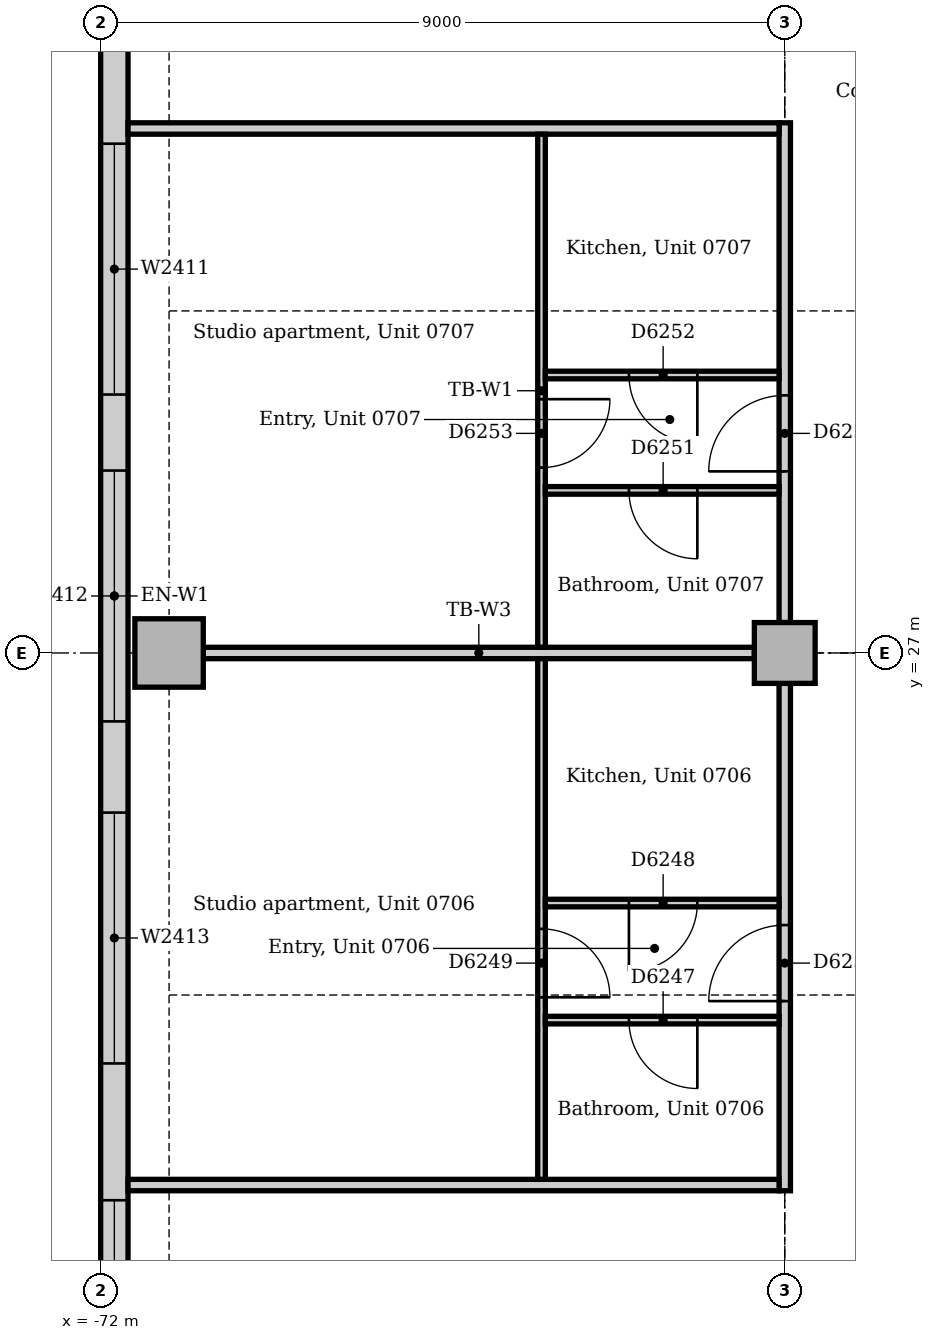
"""IFC4 building model, lengths in metres.
Left out: names, types, materials, properties, quantities, classifications, styles, units other than length and angle.
Written with IfcOpenShell. Run it as: python <this file> out.ifc"""

import sys

from ifc_helpers import new_model, si_unit, direction, frame, frame_2d, origin, origin_2d, place, context, subcontext, project, spatial, rectangle, extrude, element, fill, save


model = new_model("IFC4")
c1 = context("Model", 3, precision=1e-05, world=origin(), true_north=direction((0.0, 1.0)))
c2 = subcontext(c1, "Body", "Model", "MODEL_VIEW")
j1 = project(units=[si_unit("LENGTHUNIT", "METRE"), si_unit("PLANEANGLEUNIT", "RADIAN")], contexts=[c1])
p1 = place(None, origin())
s1 = spatial("IfcSite", under=j1, at=p1, CompositionType="ELEMENT")
p2 = place(p1, origin())
s2 = spatial("IfcBuilding", under=s1, at=p2, CompositionType="ELEMENT")
p3 = place(p2, frame((0.0, 0.0, 34.0)))
s3 = spatial("IfcBuildingStorey", under=s2, at=p3, CompositionType="ELEMENT", Elevation=34.0)
p4 = place(p3, frame((-71.1, 27.0, 0.0), z_axis=(0.0, 0.0, 1.0), x_axis=(1.0, 0.0, 0.0)))
e1 = element("IfcColumn", 1, at=p4, inside=s3, PredefinedType="COLUMN", context=c2, shape_type="SweptSolid", body=[
    extrude(rectangle(XDim=0.9, YDim=0.9, at=origin_2d()), origin(), (0.0, 0.0, 1.0), 3.85),
])
p5 = place(p3, frame((-63.0, 27.0, 0.0), z_axis=(0.0, 0.0, 1.0), x_axis=(1.0, 0.0, 0.0)))
e2 = element("IfcColumn", 2, at=p5, inside=s3, PredefinedType="COLUMN", context=c2, shape_type="SweptSolid", body=[
    extrude(rectangle(XDim=0.8, YDim=0.8, at=origin_2d()), origin(), (0.0, 0.0, 1.0), 3.85),
])
p6 = place(p3, frame((-71.82, 40.757, 0.0), z_axis=(0.0, 0.0, 1.0), x_axis=(0.0, -1.0, 0.0)))
e3 = element("IfcWall", 3, at=p6, inside=s3, PredefinedType="STANDARD", context=c2, shape_type="SweptSolid", body=[
    extrude(rectangle(XDim=26.015, YDim=0.36, at=frame_2d((13.007, 0.0))), origin(), (0.0, 0.0, 1.0), 3.85),
])
p7 = place(p6, frame((2.357, 0.0, 0.9)))
e4 = element("IfcOpeningElement", 4, at=p7, cuts=e3, PredefinedType="OPENING", context=c2, shape_type="SweptSolid", body=[
    extrude(rectangle(XDim=3.3, YDim=1.6, at=frame_2d((1.65, 0.8))), frame((0.0, 0.19, 0.0), z_axis=(0.0, -1.0, 0.0), x_axis=(1.0, 0.0, 0.0)), (0.0, 0.0, 1.0), 0.38),
])
p8 = place(p6, frame((7.057, 0.0, 0.9)))
e5 = element("IfcOpeningElement", 5, at=p8, cuts=e3, PredefinedType="OPENING", context=c2, shape_type="SweptSolid", body=[
    extrude(rectangle(XDim=3.3, YDim=1.6, at=frame_2d((1.65, 0.8))), frame((0.0, 0.19, 0.0), z_axis=(0.0, -1.0, 0.0), x_axis=(1.0, 0.0, 0.0)), (0.0, 0.0, 1.0), 0.38),
])
p9 = place(p6, frame((11.357, 0.0, 0.9)))
e6 = element("IfcOpeningElement", 6, at=p9, cuts=e3, PredefinedType="OPENING", context=c2, shape_type="SweptSolid", body=[
    extrude(rectangle(XDim=3.3, YDim=1.6, at=frame_2d((1.65, 0.8))), frame((0.0, 0.19, 0.0), z_axis=(0.0, -1.0, 0.0), x_axis=(1.0, 0.0, 0.0)), (0.0, 0.0, 1.0), 0.38),
])
p10 = place(p6, frame((15.857, 0.0, 0.9)))
e7 = element("IfcOpeningElement", 7, at=p10, cuts=e3, PredefinedType="OPENING", context=c2, shape_type="SweptSolid", body=[
    extrude(rectangle(XDim=3.3, YDim=1.6, at=frame_2d((1.65, 0.8))), frame((0.0, 0.19, 0.0), z_axis=(0.0, -1.0, 0.0), x_axis=(1.0, 0.0, 0.0)), (0.0, 0.0, 1.0), 0.38),
])
p11 = place(p6, frame((20.957, 0.0, 0.9)))
e8 = element("IfcOpeningElement", 8, at=p11, cuts=e3, PredefinedType="OPENING", context=c2, shape_type="SweptSolid", body=[
    extrude(rectangle(XDim=3.3, YDim=1.6, at=frame_2d((1.65, 0.8))), frame((0.0, 0.19, 0.0), z_axis=(0.0, -1.0, 0.0), x_axis=(1.0, 0.0, 0.0)), (0.0, 0.0, 1.0), 0.38),
])
p12 = place(p3, frame((-63.0, 19.925, 0.0), z_axis=(0.0, 0.0, 1.0), x_axis=(0.0, 1.0, 0.0)))
e9 = element("IfcWall", 9, at=p12, inside=s3, PredefinedType="PARTITIONING", context=c2, shape_type="SweptSolid", body=[
    extrude(rectangle(XDim=6.675, YDim=0.15, at=frame_2d((3.337, 0.0))), origin(), (0.0, 0.0, 1.0), 3.158),
])
p13 = place(p12, frame((2.495, 0.0, 0.0)))
e10 = element("IfcOpeningElement", 10, at=p13, cuts=e9, PredefinedType="OPENING", context=c2, shape_type="SweptSolid", body=[
    extrude(rectangle(XDim=1.0, YDim=2.1, at=frame_2d((0.5, 1.05))), frame((0.0, 0.085, 0.0), z_axis=(0.0, -1.0, 0.0), x_axis=(1.0, 0.0, 0.0)), (0.0, 0.0, 1.0), 0.17),
])
p14 = place(p3, frame((-63.0, 27.4, 0.0), z_axis=(0.0, 0.0, 1.0), x_axis=(0.0, 1.0, 0.0)))
e11 = element("IfcWall", 11, at=p14, inside=s3, PredefinedType="PARTITIONING", context=c2, shape_type="SweptSolid", body=[
    extrude(rectangle(XDim=6.575, YDim=0.15, at=frame_2d((3.288, 0.0))), origin(), (0.0, 0.0, 1.0), 3.158),
])
p15 = place(p14, frame((1.989, 0.0, 0.0)))
e12 = element("IfcOpeningElement", 12, at=p15, cuts=e11, PredefinedType="OPENING", context=c2, shape_type="SweptSolid", body=[
    extrude(rectangle(XDim=1.0, YDim=2.1, at=frame_2d((0.5, 1.05))), frame((0.0, 0.085, 0.0), z_axis=(0.0, -1.0, 0.0), x_axis=(1.0, 0.0, 0.0)), (0.0, 0.0, 1.0), 0.17),
])
for number, where, z_axis, x_axis in (
    (13, (-71.64, 20.0, 0.0), (0.0, 0.0, 1.0), (1.0, 0.0, 0.0)),
    (14, (-71.64, 33.9, 0.0), (0.0, 0.0, 1.0), (1.0, 0.0, 0.0)),
):
    element("IfcWall", number, at=place(p3, frame(where, z_axis=z_axis, x_axis=x_axis)), inside=s3, PredefinedType="PARTITIONING", context=c2, shape_type="SweptSolid", body=[
        extrude(rectangle(XDim=8.565, YDim=0.15, at=frame_2d((4.282, 0.0))), origin(), (0.0, 0.0, 1.0), 3.85),
    ])
p16 = place(p3, frame((-70.65, 27.0, 0.0), z_axis=(0.0, 0.0, 1.0), x_axis=(1.0, 0.0, 0.0)))
e15 = element("IfcWall", 15, at=p16, inside=s3, PredefinedType="PARTITIONING", context=c2, shape_type="SweptSolid", body=[
    extrude(rectangle(XDim=7.25, YDim=0.15, at=frame_2d((3.625, 0.0))), origin(), (0.0, 0.0, 1.0), 3.15),
])
p17 = place(p3, frame((-66.2, 27.075, 0.0), z_axis=(0.0, 0.0, 1.0), x_axis=(0.0, 1.0, 0.0)))
e16 = element("IfcWall", 16, at=p17, inside=s3, PredefinedType="PARTITIONING", context=c2, shape_type="SweptSolid", body=[
    extrude(rectangle(XDim=6.75, YDim=0.1, at=frame_2d((3.375, 0.0))), origin(), (0.0, 0.0, 1.0), 3.85),
])
p18 = place(p17, frame((2.364, 0.0, 0.0)))
e17 = element("IfcOpeningElement", 17, at=p18, cuts=e16, PredefinedType="OPENING", context=c2, shape_type="SweptSolid", body=[
    extrude(rectangle(XDim=0.9, YDim=2.1, at=frame_2d((0.45, 1.05))), frame((0.0, 0.06, 0.0), z_axis=(0.0, -1.0, 0.0), x_axis=(1.0, 0.0, 0.0)), (0.0, 0.0, 1.0), 0.12),
])
p19 = place(p3, frame((-66.2, 20.075, 0.0), z_axis=(0.0, 0.0, 1.0), x_axis=(0.0, 1.0, 0.0)))
e18 = element("IfcWall", 18, at=p19, inside=s3, PredefinedType="PARTITIONING", context=c2, shape_type="SweptSolid", body=[
    extrude(rectangle(XDim=6.85, YDim=0.1, at=frame_2d((3.425, 0.0))), origin(), (0.0, 0.0, 1.0), 3.85),
])
p20 = place(p19, frame((2.395, 0.0, 0.0)))
e19 = element("IfcOpeningElement", 19, at=p20, cuts=e18, PredefinedType="OPENING", context=c2, shape_type="SweptSolid", body=[
    extrude(rectangle(XDim=0.9, YDim=2.1, at=frame_2d((0.45, 1.05))), frame((0.0, 0.06, 0.0), z_axis=(0.0, -1.0, 0.0), x_axis=(1.0, 0.0, 0.0)), (0.0, 0.0, 1.0), 0.12),
])
p21 = place(p3, frame((-66.15, 22.17, 0.0), z_axis=(0.0, 0.0, 1.0), x_axis=(1.0, 0.0, 0.0)))
e20 = element("IfcWall", 20, at=p21, inside=s3, PredefinedType="PARTITIONING", context=c2, shape_type="SweptSolid", body=[
    extrude(rectangle(XDim=3.075, YDim=0.1, at=frame_2d((1.538, 0.0))), origin(), (0.0, 0.0, 1.0), 3.85),
])
p22 = place(p21, frame((1.1, 0.0, 0.0)))
e21 = element("IfcOpeningElement", 21, at=p22, cuts=e20, PredefinedType="OPENING", context=c2, shape_type="SweptSolid", body=[
    extrude(rectangle(XDim=0.9, YDim=2.1, at=frame_2d((0.45, 1.05))), frame((0.0, 0.06, 0.0), z_axis=(0.0, -1.0, 0.0), x_axis=(1.0, 0.0, 0.0)), (0.0, 0.0, 1.0), 0.12),
])
p23 = place(p3, frame((-66.15, 23.71, 0.0), z_axis=(0.0, 0.0, 1.0), x_axis=(1.0, 0.0, 0.0)))
e22 = element("IfcWall", 22, at=p23, inside=s3, PredefinedType="PARTITIONING", context=c2, shape_type="SweptSolid", body=[
    extrude(rectangle(XDim=3.075, YDim=0.1, at=frame_2d((1.538, 0.0))), origin(), (0.0, 0.0, 1.0), 3.85),
])
p24 = place(p23, frame((1.1, 0.0, 0.0)))
e23 = element("IfcOpeningElement", 23, at=p24, cuts=e22, PredefinedType="OPENING", context=c2, shape_type="SweptSolid", body=[
    extrude(rectangle(XDim=0.9, YDim=2.1, at=frame_2d((0.45, 1.05))), frame((0.0, 0.06, 0.0), z_axis=(0.0, -1.0, 0.0), x_axis=(1.0, 0.0, 0.0)), (0.0, 0.0, 1.0), 0.12),
])
p25 = place(p3, frame((-66.15, 29.139, 0.0), z_axis=(0.0, 0.0, 1.0), x_axis=(1.0, 0.0, 0.0)))
e24 = element("IfcWall", 24, at=p25, inside=s3, PredefinedType="PARTITIONING", context=c2, shape_type="SweptSolid", body=[
    extrude(rectangle(XDim=3.075, YDim=0.1, at=frame_2d((1.538, 0.0))), origin(), (0.0, 0.0, 1.0), 3.85),
])
p26 = place(p25, frame((1.1, 0.0, 0.0)))
e25 = element("IfcOpeningElement", 25, at=p26, cuts=e24, PredefinedType="OPENING", context=c2, shape_type="SweptSolid", body=[
    extrude(rectangle(XDim=0.9, YDim=2.1, at=frame_2d((0.45, 1.05))), frame((0.0, 0.06, 0.0), z_axis=(0.0, -1.0, 0.0), x_axis=(1.0, 0.0, 0.0)), (0.0, 0.0, 1.0), 0.12),
])
p27 = place(p3, frame((-66.15, 30.657, 0.0), z_axis=(0.0, 0.0, 1.0), x_axis=(1.0, 0.0, 0.0)))
e26 = element("IfcWall", 26, at=p27, inside=s3, PredefinedType="PARTITIONING", context=c2, shape_type="SweptSolid", body=[
    extrude(rectangle(XDim=3.075, YDim=0.1, at=frame_2d((1.538, 0.0))), origin(), (0.0, 0.0, 1.0), 3.85),
])
p28 = place(p27, frame((1.1, 0.0, 0.0)))
e27 = element("IfcOpeningElement", 27, at=p28, cuts=e26, PredefinedType="OPENING", context=c2, shape_type="SweptSolid", body=[
    extrude(rectangle(XDim=0.9, YDim=2.1, at=frame_2d((0.45, 1.05))), frame((0.0, 0.06, 0.0), z_axis=(0.0, -1.0, 0.0), x_axis=(1.0, 0.0, 0.0)), (0.0, 0.0, 1.0), 0.12),
])
p29 = place(p8, origin())
e28 = element("IfcWindow", 28, at=p29, inside=s3, PartitioningType="SINGLE_PANEL", PredefinedType="WINDOW", context=c2, shape_type="SweptSolid", body=[
    extrude(rectangle(XDim=3.3, YDim=1.6, at=frame_2d((1.65, 0.8))), frame((0.0, 0.13, 0.0), z_axis=(0.0, -1.0, 0.0), x_axis=(1.0, 0.0, 0.0)), (0.0, 0.0, 1.0), 0.06),
])
fill(e5, e28)
p30 = place(p9, origin())
e29 = element("IfcWindow", 29, at=p30, inside=s3, PartitioningType="SINGLE_PANEL", PredefinedType="WINDOW", context=c2, shape_type="SweptSolid", body=[
    extrude(rectangle(XDim=3.3, YDim=1.6, at=frame_2d((1.65, 0.8))), frame((0.0, 0.13, 0.0), z_axis=(0.0, -1.0, 0.0), x_axis=(1.0, 0.0, 0.0)), (0.0, 0.0, 1.0), 0.06),
])
fill(e6, e29)
p31 = place(p10, origin())
e30 = element("IfcWindow", 30, at=p31, inside=s3, PartitioningType="SINGLE_PANEL", PredefinedType="WINDOW", context=c2, shape_type="SweptSolid", body=[
    extrude(rectangle(XDim=3.3, YDim=1.6, at=frame_2d((1.65, 0.8))), frame((0.0, 0.13, 0.0), z_axis=(0.0, -1.0, 0.0), x_axis=(1.0, 0.0, 0.0)), (0.0, 0.0, 1.0), 0.06),
])
fill(e7, e30)
p32 = place(p11, origin())
e31 = element("IfcWindow", 31, at=p32, inside=s3, PartitioningType="SINGLE_PANEL", PredefinedType="WINDOW", context=c2, shape_type="SweptSolid", body=[
    extrude(rectangle(XDim=3.3, YDim=1.6, at=frame_2d((1.65, 0.8))), frame((0.0, 0.13, 0.0), z_axis=(0.0, -1.0, 0.0), x_axis=(1.0, 0.0, 0.0)), (0.0, 0.0, 1.0), 0.06),
])
fill(e8, e31)
p33 = place(p22, frame((0.9, 0.0, 0.0), z_axis=(0.0, 0.0, 1.0), x_axis=(-1.0, 0.0, 0.0)))
e32 = element("IfcDoor", 32, at=p33, inside=s3, OperationType="SINGLE_SWING_LEFT", PredefinedType="DOOR", context=c2, shape_type="SweptSolid", body=[
    extrude(rectangle(XDim=0.9, YDim=2.1, at=frame_2d((0.45, 1.05))), frame((0.0, 0.025, 0.0), z_axis=(0.0, -1.0, 0.0), x_axis=(1.0, 0.0, 0.0)), (0.0, 0.0, 1.0), 0.05),
])
fill(e21, e32)
p34 = place(p24, frame((0.9, 0.0, 0.0), z_axis=(0.0, 0.0, 1.0), x_axis=(-1.0, 0.0, 0.0)))
e33 = element("IfcDoor", 33, at=p34, inside=s3, OperationType="SINGLE_SWING_RIGHT", PredefinedType="DOOR", context=c2, shape_type="SweptSolid", body=[
    extrude(rectangle(XDim=0.9, YDim=2.1, at=frame_2d((0.45, 1.05))), frame((0.0, 0.025, 0.0), z_axis=(0.0, -1.0, 0.0), x_axis=(1.0, 0.0, 0.0)), (0.0, 0.0, 1.0), 0.05),
])
fill(e23, e33)
p35 = place(p20, frame((0.9, 0.0, 0.0), z_axis=(0.0, 0.0, 1.0), x_axis=(-1.0, 0.0, 0.0)))
e34 = element("IfcDoor", 34, at=p35, inside=s3, OperationType="SINGLE_SWING_RIGHT", PredefinedType="DOOR", context=c2, shape_type="SweptSolid", body=[
    extrude(rectangle(XDim=0.9, YDim=2.1, at=frame_2d((0.45, 1.05))), frame((0.0, 0.025, 0.0), z_axis=(0.0, -1.0, 0.0), x_axis=(1.0, 0.0, 0.0)), (0.0, 0.0, 1.0), 0.05),
])
fill(e19, e34)
p36 = place(p13, origin())
e35 = element("IfcDoor", 35, at=p36, inside=s3, OperationType="SINGLE_SWING_LEFT", PredefinedType="DOOR", context=c2, shape_type="SweptSolid", body=[
    extrude(rectangle(XDim=1.0, YDim=2.1, at=frame_2d((0.5, 1.05))), frame((0.0, 0.025, 0.0), z_axis=(0.0, -1.0, 0.0), x_axis=(1.0, 0.0, 0.0)), (0.0, 0.0, 1.0), 0.05),
])
fill(e10, e35)
p37 = place(p26, frame((0.9, 0.0, 0.0), z_axis=(0.0, 0.0, 1.0), x_axis=(-1.0, 0.0, 0.0)))
e36 = element("IfcDoor", 36, at=p37, inside=s3, OperationType="SINGLE_SWING_LEFT", PredefinedType="DOOR", context=c2, shape_type="SweptSolid", body=[
    extrude(rectangle(XDim=0.9, YDim=2.1, at=frame_2d((0.45, 1.05))), frame((0.0, 0.025, 0.0), z_axis=(0.0, -1.0, 0.0), x_axis=(1.0, 0.0, 0.0)), (0.0, 0.0, 1.0), 0.05),
])
fill(e25, e36)
p38 = place(p28, frame((0.9, 0.0, 0.0), z_axis=(0.0, 0.0, 1.0), x_axis=(-1.0, 0.0, 0.0)))
e37 = element("IfcDoor", 37, at=p38, inside=s3, OperationType="SINGLE_SWING_LEFT", PredefinedType="DOOR", context=c2, shape_type="SweptSolid", body=[
    extrude(rectangle(XDim=0.9, YDim=2.1, at=frame_2d((0.45, 1.05))), frame((0.0, 0.025, 0.0), z_axis=(0.0, -1.0, 0.0), x_axis=(1.0, 0.0, 0.0)), (0.0, 0.0, 1.0), 0.05),
])
fill(e27, e37)
p39 = place(p18, frame((0.9, 0.0, 0.0), z_axis=(0.0, 0.0, 1.0), x_axis=(-1.0, 0.0, 0.0)))
e38 = element("IfcDoor", 38, at=p39, inside=s3, OperationType="SINGLE_SWING_LEFT", PredefinedType="DOOR", context=c2, shape_type="SweptSolid", body=[
    extrude(rectangle(XDim=0.9, YDim=2.1, at=frame_2d((0.45, 1.05))), frame((0.0, 0.025, 0.0), z_axis=(0.0, -1.0, 0.0), x_axis=(1.0, 0.0, 0.0)), (0.0, 0.0, 1.0), 0.05),
])
fill(e17, e38)
p40 = place(p15, origin())
e39 = element("IfcDoor", 39, at=p40, inside=s3, OperationType="SINGLE_SWING_LEFT", PredefinedType="DOOR", context=c2, shape_type="SweptSolid", body=[
    extrude(rectangle(XDim=1.0, YDim=2.1, at=frame_2d((0.5, 1.05))), frame((0.0, 0.025, 0.0), z_axis=(0.0, -1.0, 0.0), x_axis=(1.0, 0.0, 0.0)), (0.0, 0.0, 1.0), 0.05),
])
fill(e12, e39)
save(model, sys.argv[1])
